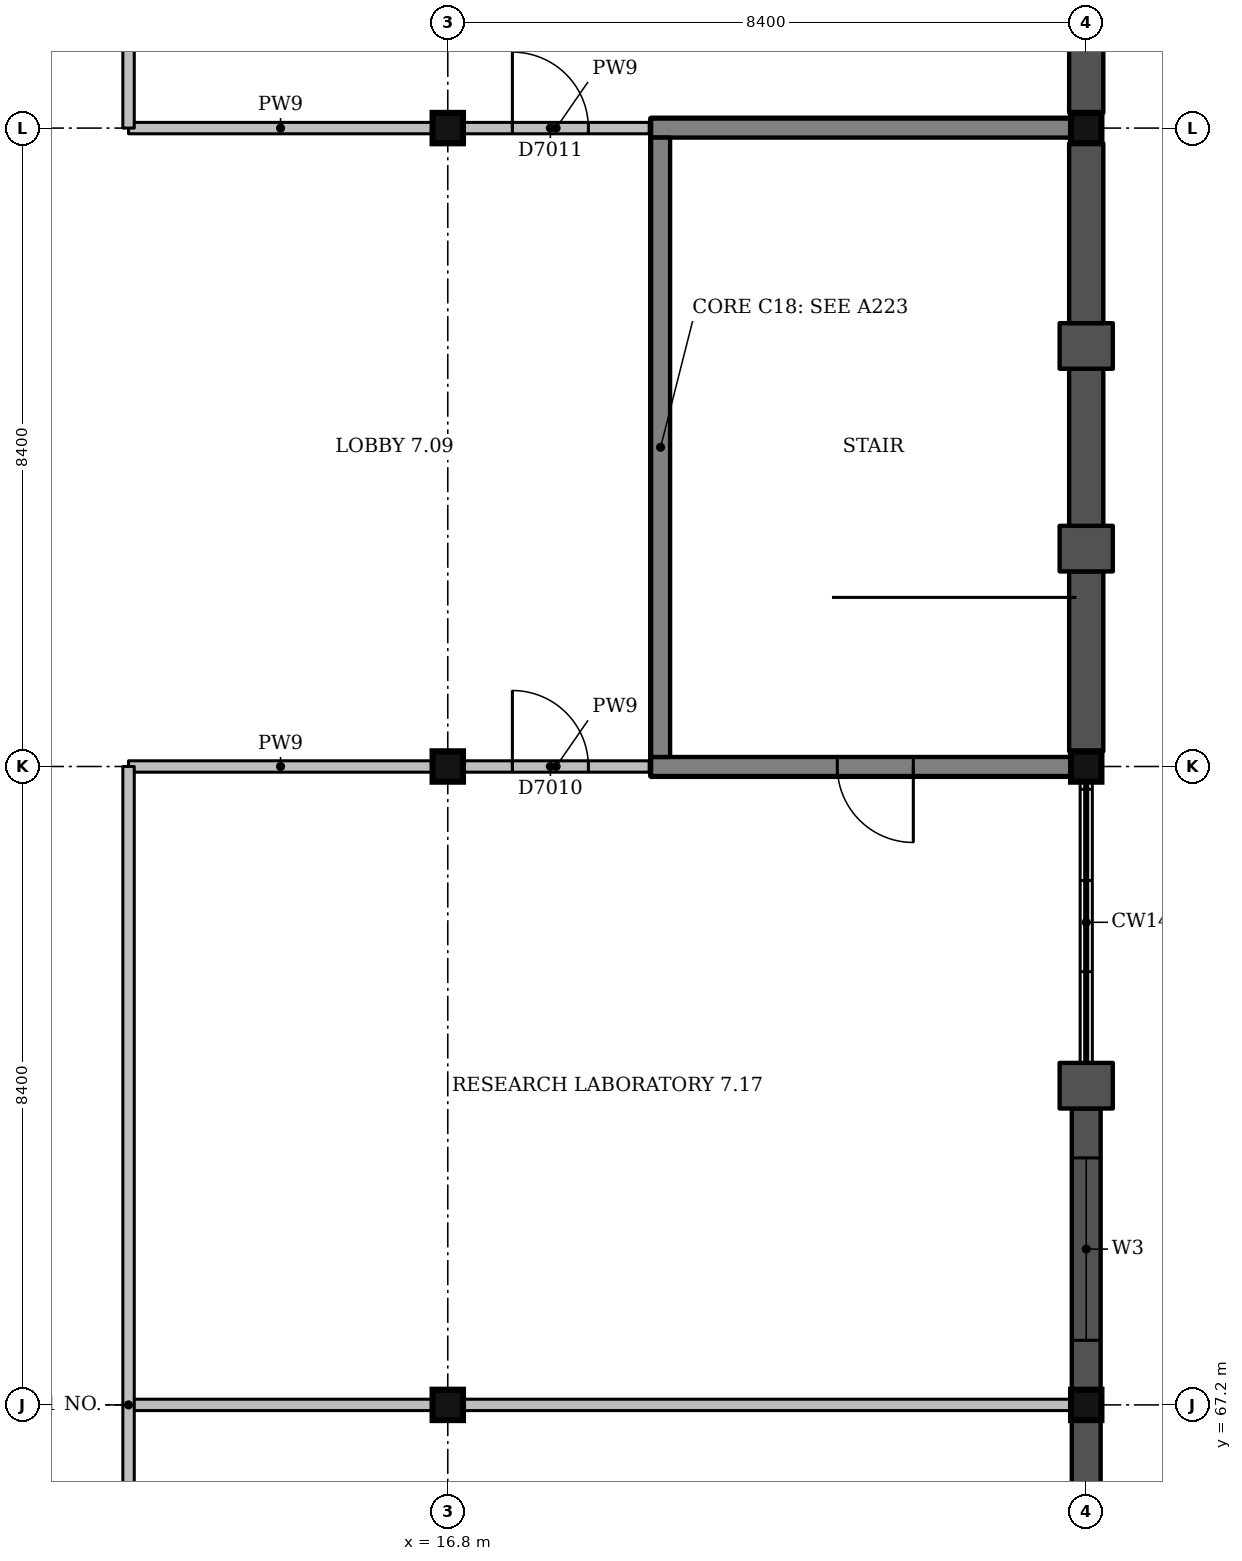
"""IFC4 building model, lengths in metres.
Left out: names, types, materials, properties, quantities, classifications, styles, units other than length and angle.
Written with IfcOpenShell. Run it as: python <this file> out.ifc"""

import sys

from ifc_helpers import new_model, si_unit, direction, frame, frame_2d, origin, origin_2d, place, context, subcontext, project, spatial, rectangle, extrude, element, fill, save


model = new_model("IFC4")
c1 = context("Model", 3, precision=1e-05, world=origin(), true_north=direction((0.0, 1.0)))
c2 = subcontext(c1, "Body", "Model", "MODEL_VIEW")
j1 = project(units=[si_unit("LENGTHUNIT", "METRE"), si_unit("PLANEANGLEUNIT", "RADIAN")], contexts=[c1])
p1 = place(None, origin())
s1 = spatial("IfcSite", under=j1, at=p1, CompositionType="ELEMENT")
p2 = place(p1, origin())
s2 = spatial("IfcBuilding", under=s1, at=p2, CompositionType="ELEMENT")
p3 = place(p2, frame((0.0, 0.0, 31.5)))
s3 = spatial("IfcBuildingStorey", under=s2, at=p3, CompositionType="ELEMENT", Elevation=31.5)
for number, where, z_axis, x_axis in (
    (1, (16.8, 67.2, 0.0), (0.0, 0.0, 1.0), (1.0, 0.0, 0.0)),
    (2, (16.8, 75.6, 0.0), (0.0, 0.0, 1.0), (1.0, 0.0, 0.0)),
    (3, (16.8, 84.0, 0.0), (0.0, 0.0, 1.0), (1.0, 0.0, 0.0)),
    (4, (25.2, 67.2, 0.0), (0.0, 0.0, 1.0), (1.0, 0.0, 0.0)),
    (5, (25.2, 75.6, 0.0), (0.0, 0.0, 1.0), (1.0, 0.0, 0.0)),
    (6, (25.2, 84.0, 0.0), (0.0, 0.0, 1.0), (1.0, 0.0, 0.0)),
):
    element("IfcColumn", number, at=place(p3, frame(where, z_axis=z_axis, x_axis=x_axis)), inside=s3, PredefinedType="COLUMN", context=c2, shape_type="SweptSolid", body=[
        extrude(rectangle(XDim=0.4, YDim=0.4, at=origin_2d()), origin(), (0.0, 0.0, 1.0), 4.5),
    ])
p4 = place(p3, frame((19.475, 75.6, 0.0), z_axis=(0.0, 0.0, 1.0), x_axis=(1.0, 0.0, 0.0)))
e7 = element("IfcWall", 7, at=p4, inside=s3, PredefinedType="SHEAR", context=c2, shape_type="SweptSolid", body=[
    extrude(rectangle(XDim=5.525, YDim=0.25, at=frame_2d((2.762, 0.0))), origin(), (0.0, 0.0, 1.0), 4.2),
])
p5 = place(p4, frame((2.45, 0.0, 0.0)))
e8 = element("IfcOpeningElement", 8, at=p5, cuts=e7, PredefinedType="OPENING", context=c2, shape_type="SweptSolid", body=[
    extrude(rectangle(XDim=1.0, YDim=2.1, at=frame_2d((0.5, 1.05))), frame((0.0, 0.135, 0.0), z_axis=(0.0, -1.0, 0.0), x_axis=(1.0, 0.0, 0.0)), (0.0, 0.0, 1.0), 0.27),
])
p6 = place(p3, frame((19.475, 84.0, 0.0), z_axis=(0.0, 0.0, 1.0), x_axis=(1.0, 0.0, 0.0)))
e9 = element("IfcWall", 9, at=p6, inside=s3, PredefinedType="SHEAR", context=c2, shape_type="SweptSolid", body=[
    extrude(rectangle(XDim=5.525, YDim=0.25, at=frame_2d((2.762, 0.0))), origin(), (0.0, 0.0, 1.0), 4.2),
])
p7 = place(p3, frame((19.6, 75.725, 0.0), z_axis=(0.0, 0.0, 1.0), x_axis=(0.0, 1.0, 0.0)))
e10 = element("IfcWall", 10, at=p7, inside=s3, PredefinedType="SHEAR", context=c2, shape_type="SweptSolid", body=[
    extrude(rectangle(XDim=8.15, YDim=0.25, at=frame_2d((4.075, 0.0))), origin(), (0.0, 0.0, 1.0), 4.2),
])
p8 = place(p3, frame((25.2, 64.633, 0.0), z_axis=(0.0, 0.0, 1.0), x_axis=(0.0, 1.0, 0.0)))
e11 = element("IfcWall", 11, at=p8, inside=s3, PredefinedType="SOLIDWALL", context=c2, shape_type="SweptSolid", body=[
    extrude(rectangle(XDim=2.367, YDim=0.38, at=frame_2d((1.183, 0.0))), origin(), (0.0, 0.0, 1.0), 3.6),
])
p9 = place(p3, frame((25.2, 67.4, 0.0), z_axis=(0.0, 0.0, 1.0), x_axis=(0.0, 1.0, 0.0)))
e12 = element("IfcWall", 12, at=p9, inside=s3, PredefinedType="SOLIDWALL", context=c2, shape_type="SweptSolid", body=[
    extrude(rectangle(XDim=3.7, YDim=0.38, at=frame_2d((1.85, 0.0))), origin(), (0.0, 0.0, 1.0), 3.6),
])
p10 = place(p9, frame((0.65, 0.0, 1.2)))
e13 = element("IfcOpeningElement", 13, at=p10, cuts=e12, PredefinedType="OPENING", context=c2, shape_type="SweptSolid", body=[
    extrude(rectangle(XDim=2.4, YDim=1.5, at=frame_2d((1.2, 0.75))), frame((0.0, 0.2, 0.0), z_axis=(0.0, -1.0, 0.0), x_axis=(1.0, 0.0, 0.0)), (0.0, 0.0, 1.0), 0.4),
])
p11 = place(p3, frame((25.2, 71.1, 0.0), z_axis=(0.0, 0.0, 1.0), x_axis=(0.0, 1.0, 0.0)))
e14 = element("IfcWall", 14, at=p11, inside=s3, PredefinedType="SOLIDWALL", context=c2, shape_type="SweptSolid", body=[
    extrude(rectangle(XDim=0.6, YDim=0.7, at=frame_2d((0.3, 0.0))), origin(), (0.0, 0.0, 1.0), 3.6),
])
p12 = place(p3, frame((25.2, 75.8, 0.0), z_axis=(0.0, 0.0, 1.0), x_axis=(0.0, 1.0, 0.0)))
e15 = element("IfcWall", 15, at=p12, inside=s3, PredefinedType="SOLIDWALL", context=c2, shape_type="SweptSolid", body=[
    extrude(rectangle(XDim=2.367, YDim=0.45, at=frame_2d((1.183, 0.0))), origin(), (0.0, 0.0, 1.0), 4.2),
])
p13 = place(p3, frame((25.2, 78.167, 0.0), z_axis=(0.0, 0.0, 1.0), x_axis=(0.0, 1.0, 0.0)))
e16 = element("IfcWall", 16, at=p13, inside=s3, PredefinedType="SOLIDWALL", context=c2, shape_type="SweptSolid", body=[
    extrude(rectangle(XDim=0.6, YDim=0.7, at=frame_2d((0.3, 0.0))), origin(), (0.0, 0.0, 1.0), 4.2),
])
p14 = place(p3, frame((25.2, 78.767, 0.0), z_axis=(0.0, 0.0, 1.0), x_axis=(0.0, 1.0, 0.0)))
e17 = element("IfcWall", 17, at=p14, inside=s3, PredefinedType="SOLIDWALL", context=c2, shape_type="SweptSolid", body=[
    extrude(rectangle(XDim=2.067, YDim=0.45, at=frame_2d((1.033, 0.0))), origin(), (0.0, 0.0, 1.0), 4.2),
])
p15 = place(p3, frame((25.2, 80.833, 0.0), z_axis=(0.0, 0.0, 1.0), x_axis=(0.0, 1.0, 0.0)))
e18 = element("IfcWall", 18, at=p15, inside=s3, PredefinedType="SOLIDWALL", context=c2, shape_type="SweptSolid", body=[
    extrude(rectangle(XDim=0.6, YDim=0.7, at=frame_2d((0.3, 0.0))), origin(), (0.0, 0.0, 1.0), 4.2),
])
p16 = place(p3, frame((25.2, 81.433, 0.0), z_axis=(0.0, 0.0, 1.0), x_axis=(0.0, 1.0, 0.0)))
e19 = element("IfcWall", 19, at=p16, inside=s3, PredefinedType="SOLIDWALL", context=c2, shape_type="SweptSolid", body=[
    extrude(rectangle(XDim=2.367, YDim=0.45, at=frame_2d((1.183, 0.0))), origin(), (0.0, 0.0, 1.0), 4.2),
])
p17 = place(p3, frame((25.2, 84.2, 0.0), z_axis=(0.0, 0.0, 1.0), x_axis=(0.0, 1.0, 0.0)))
e20 = element("IfcWall", 20, at=p17, inside=s3, PredefinedType="SOLIDWALL", context=c2, shape_type="SweptSolid", body=[
    extrude(rectangle(XDim=2.367, YDim=0.45, at=frame_2d((1.183, 0.0))), origin(), (0.0, 0.0, 1.0), 3.6),
])
p18 = place(p3, frame((12.6, 67.2, 0.0), z_axis=(0.0, 0.0, 1.0), x_axis=(1.0, 0.0, 0.0)))
e21 = element("IfcWall", 21, at=p18, inside=s3, PredefinedType="PARTITIONING", context=c2, shape_type="SweptSolid", body=[
    extrude(rectangle(XDim=4.0, YDim=0.15, at=frame_2d((2.0, 0.0))), origin(), (0.0, 0.0, 1.0), 3.6),
])
p19 = place(p3, frame((17.0, 67.2, 0.0), z_axis=(0.0, 0.0, 1.0), x_axis=(1.0, 0.0, 0.0)))
e22 = element("IfcWall", 22, at=p19, inside=s3, PredefinedType="PARTITIONING", context=c2, shape_type="SweptSolid", body=[
    extrude(rectangle(XDim=8.0, YDim=0.15, at=frame_2d((4.0, 0.0))), origin(), (0.0, 0.0, 1.0), 3.6),
])
p20 = place(p3, frame((12.6, 75.6, 0.0), z_axis=(0.0, 0.0, 1.0), x_axis=(1.0, 0.0, 0.0)))
e23 = element("IfcWall", 23, at=p20, inside=s3, PredefinedType="PARTITIONING", context=c2, shape_type="SweptSolid", body=[
    extrude(rectangle(XDim=4.0, YDim=0.15, at=frame_2d((2.0, 0.0))), origin(), (0.0, 0.0, 1.0), 3.6),
])
p21 = place(p3, frame((17.0, 75.6, 0.0), z_axis=(0.0, 0.0, 1.0), x_axis=(1.0, 0.0, 0.0)))
e24 = element("IfcWall", 24, at=p21, inside=s3, PredefinedType="PARTITIONING", context=c2, shape_type="SweptSolid", body=[
    extrude(rectangle(XDim=2.45, YDim=0.15, at=frame_2d((1.225, 0.0))), origin(), (0.0, 0.0, 1.0), 3.6),
])
p22 = place(p21, frame((0.65, 0.0, 0.0)))
e25 = element("IfcOpeningElement", 25, at=p22, cuts=e24, PredefinedType="OPENING", context=c2, shape_type="SweptSolid", body=[
    extrude(rectangle(XDim=1.0, YDim=2.1, at=frame_2d((0.5, 1.05))), frame((0.0, 0.085, 0.0), z_axis=(0.0, -1.0, 0.0), x_axis=(1.0, 0.0, 0.0)), (0.0, 0.0, 1.0), 0.17),
])
p23 = place(p3, frame((12.6, 84.0, 0.0), z_axis=(0.0, 0.0, 1.0), x_axis=(1.0, 0.0, 0.0)))
e26 = element("IfcWall", 26, at=p23, inside=s3, PredefinedType="PARTITIONING", context=c2, shape_type="SweptSolid", body=[
    extrude(rectangle(XDim=4.0, YDim=0.15, at=frame_2d((2.0, 0.0))), origin(), (0.0, 0.0, 1.0), 3.6),
])
p24 = place(p3, frame((17.0, 84.0, 0.0), z_axis=(0.0, 0.0, 1.0), x_axis=(1.0, 0.0, 0.0)))
e27 = element("IfcWall", 27, at=p24, inside=s3, PredefinedType="PARTITIONING", context=c2, shape_type="SweptSolid", body=[
    extrude(rectangle(XDim=2.45, YDim=0.15, at=frame_2d((1.225, 0.0))), origin(), (0.0, 0.0, 1.0), 3.6),
])
p25 = place(p24, frame((0.65, 0.0, 0.0)))
e28 = element("IfcOpeningElement", 28, at=p25, cuts=e27, PredefinedType="OPENING", context=c2, shape_type="SweptSolid", body=[
    extrude(rectangle(XDim=1.0, YDim=2.1, at=frame_2d((0.5, 1.05))), frame((0.0, 0.085, 0.0), z_axis=(0.0, -1.0, 0.0), x_axis=(1.0, 0.0, 0.0)), (0.0, 0.0, 1.0), 0.17),
])
p26 = place(p3, frame((12.6, 58.8, 0.0), z_axis=(0.0, 0.0, 1.0), x_axis=(0.0, 1.0, 0.0)))
e29 = element("IfcWall", 29, at=p26, inside=s3, PredefinedType="PARTITIONING", context=c2, shape_type="SweptSolid", body=[
    extrude(rectangle(XDim=16.8, YDim=0.15, at=frame_2d((8.4, 0.0))), origin(), (0.0, 0.0, 1.0), 3.6),
])
p27 = place(p26, frame((3.8, 0.0, 0.0)))
e30 = element("IfcOpeningElement", 30, at=p27, cuts=e29, PredefinedType="OPENING", context=c2, shape_type="SweptSolid", body=[
    extrude(rectangle(XDim=1.0, YDim=2.1, at=frame_2d((0.5, 1.05))), frame((0.0, 0.085, 0.0), z_axis=(0.0, -1.0, 0.0), x_axis=(1.0, 0.0, 0.0)), (0.0, 0.0, 1.0), 0.17),
])
p28 = place(p3, frame((12.6, 84.0, 0.0), z_axis=(0.0, 0.0, 1.0), x_axis=(0.0, 1.0, 0.0)))
e31 = element("IfcWall", 31, at=p28, inside=s3, PredefinedType="PARTITIONING", context=c2, shape_type="SweptSolid", body=[
    extrude(rectangle(XDim=16.8, YDim=0.15, at=frame_2d((8.4, 0.0))), origin(), (0.0, 0.0, 1.0), 3.6),
])
p29 = place(p28, frame((12.2, 0.0, 0.0)))
e32 = element("IfcOpeningElement", 32, at=p29, cuts=e31, PredefinedType="OPENING", context=c2, shape_type="SweptSolid", body=[
    extrude(rectangle(XDim=1.0, YDim=2.1, at=frame_2d((0.5, 1.05))), frame((0.0, 0.085, 0.0), z_axis=(0.0, -1.0, 0.0), x_axis=(1.0, 0.0, 0.0)), (0.0, 0.0, 1.0), 0.17),
])
p30 = place(p10, origin())
e33 = element("IfcWindow", 33, at=p30, inside=s3, PartitioningType="SINGLE_PANEL", PredefinedType="WINDOW", context=c2, shape_type="SweptSolid", body=[
    extrude(rectangle(XDim=2.4, YDim=1.5, at=frame_2d((1.2, 0.75))), frame((0.0, 0.15, 0.0), z_axis=(0.0, -1.0, 0.0), x_axis=(1.0, 0.0, 0.0)), (0.0, 0.0, 1.0), 0.06),
])
fill(e13, e33)
p31 = place(p3, frame((0.0, 0.0, 4.2)))
p32 = place(p31, frame((12.6, 79.8, 0.0)))
p33 = place(p32, frame((0.0, 0.0, 0.25)))
e34 = element("IfcWindow", 34, at=p33, inside=s3, PartitioningType="SINGLE_PANEL", PredefinedType="SKYLIGHT", context=c2, shape_type="SweptSolid", body=[
    extrude(rectangle(XDim=0.9, YDim=1.2, at=origin_2d()), origin(), (0.0, 0.0, 1.0), 0.05),
])
p34 = place(p22, origin())
e35 = element("IfcDoor", 35, at=p34, inside=s3, OperationType="SINGLE_SWING_LEFT", PredefinedType="DOOR", context=c2, shape_type="SweptSolid", body=[
    extrude(rectangle(XDim=1.0, YDim=2.1, at=frame_2d((0.5, 1.05))), frame((0.0, 0.025, 0.0), z_axis=(0.0, -1.0, 0.0), x_axis=(1.0, 0.0, 0.0)), (0.0, 0.0, 1.0), 0.05),
])
fill(e25, e35)
p35 = place(p25, origin())
e36 = element("IfcDoor", 36, at=p35, inside=s3, OperationType="SINGLE_SWING_LEFT", PredefinedType="DOOR", context=c2, shape_type="SweptSolid", body=[
    extrude(rectangle(XDim=1.0, YDim=2.1, at=frame_2d((0.5, 1.05))), frame((0.0, 0.025, 0.0), z_axis=(0.0, -1.0, 0.0), x_axis=(1.0, 0.0, 0.0)), (0.0, 0.0, 1.0), 0.05),
])
fill(e28, e36)
p36 = place(p5, origin())
e37 = element("IfcDoor", 37, at=p36, inside=s3, OperationType="SINGLE_SWING_RIGHT", PredefinedType="DOOR", context=c2, shape_type="SweptSolid", body=[
    extrude(rectangle(XDim=1.0, YDim=2.1, at=frame_2d((0.5, 1.05))), frame((0.0, 0.025, 0.0), z_axis=(0.0, -1.0, 0.0), x_axis=(1.0, 0.0, 0.0)), (0.0, 0.0, 1.0), 0.05),
])
fill(e8, e37)
save(model, sys.argv[1])
